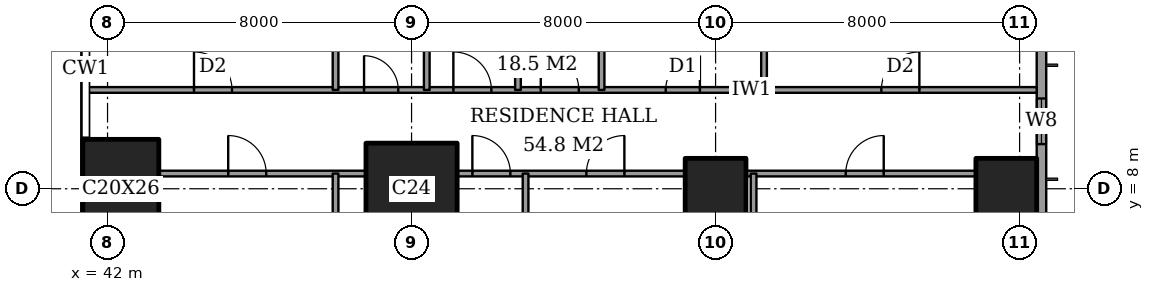
"""IFC4 building model, lengths in metres.
Left out: names, types, materials, properties, quantities, classifications, styles, units other than length and angle.
Written with IfcOpenShell. Run it as: python <this file> out.ifc"""

import sys

from ifc_helpers import new_model, si_unit, direction, frame, frame_2d, origin, origin_2d, place, context, subcontext, project, spatial, rectangle, extrude, element, fill, save


model = new_model("IFC4")
c1 = context("Model", 3, precision=1e-05, world=origin(), true_north=direction((0.0, 1.0)))
c2 = subcontext(c1, "Body", "Model", "MODEL_VIEW")
j1 = project(units=[si_unit("LENGTHUNIT", "METRE"), si_unit("PLANEANGLEUNIT", "RADIAN")], contexts=[c1])
p1 = place(None, origin())
s1 = spatial("IfcSite", under=j1, at=p1, CompositionType="ELEMENT")
p2 = place(p1, origin())
s2 = spatial("IfcBuilding", under=s1, at=p2, CompositionType="ELEMENT")
p3 = place(p2, frame((0.0, 0.0, 248.4)))
s3 = spatial("IfcBuildingStorey", under=s2, at=p3, CompositionType="ELEMENT", Elevation=248.4)
p4 = place(p3, frame((42.35, 8.0, 0.0), z_axis=(0.0, 0.0, 1.0), x_axis=(1.0, 0.0, 0.0)))
e1 = element("IfcColumn", 1, at=p4, inside=s3, PredefinedType="COLUMN", context=c2, shape_type="SweptSolid", body=[
    extrude(rectangle(XDim=2.0, YDim=2.6, at=origin_2d()), origin(), (0.0, 0.0, 1.0), 3.6),
])
p5 = place(p3, frame((50.0, 8.0, 0.0), z_axis=(0.0, 0.0, 1.0), x_axis=(1.0, 0.0, 0.0)))
e2 = element("IfcColumn", 2, at=p5, inside=s3, PredefinedType="COLUMN", context=c2, shape_type="SweptSolid", body=[
    extrude(rectangle(XDim=2.4, YDim=2.4, at=origin_2d()), origin(), (0.0, 0.0, 1.0), 3.6),
])
for number, where, z_axis, x_axis in (
    (3, (58.0, 8.0, 0.0), (0.0, 0.0, 1.0), (1.0, 0.0, 0.0)),
    (4, (65.65, 8.0, 0.0), (0.0, 0.0, 1.0), (1.0, 0.0, 0.0)),
):
    element("IfcColumn", number, at=place(p3, frame(where, z_axis=z_axis, x_axis=x_axis)), inside=s3, PredefinedType="COLUMN", context=c2, shape_type="SweptSolid", body=[
        extrude(rectangle(XDim=1.6, YDim=1.6, at=origin_2d()), origin(), (0.0, 0.0, 1.0), 3.6),
    ])
p6 = place(p3, frame((66.575, 3.175, 0.0), z_axis=(0.0, 0.0, 1.0), x_axis=(0.0, 1.0, 0.0)))
e5 = element("IfcWall", 5, at=p6, inside=s3, PredefinedType="SOLIDWALL", context=c2, shape_type="SweptSolid", body=[
    extrude(rectangle(XDim=41.65, YDim=0.25, at=frame_2d((20.825, 0.0))), origin(), (0.0, 0.0, 1.0), 3.6),
])
p7 = place(p6, frame((0.875, 0.0, 0.6)))
e6 = element("IfcOpeningElement", 6, at=p7, cuts=e5, PredefinedType="OPENING", context=c2, shape_type="SweptSolid", body=[
    extrude(rectangle(XDim=2.4, YDim=2.0, at=frame_2d((1.2, 1.0))), frame((0.0, 0.135, 0.0), z_axis=(0.0, -1.0, 0.0), x_axis=(1.0, 0.0, 0.0)), (0.0, 0.0, 1.0), 0.27),
])
p8 = place(p6, frame((6.0, 0.0, 0.6)))
e7 = element("IfcOpeningElement", 7, at=p8, cuts=e5, PredefinedType="OPENING", context=c2, shape_type="SweptSolid", body=[
    extrude(rectangle(XDim=1.2, YDim=2.0, at=frame_2d((0.6, 1.0))), frame((0.0, 0.135, 0.0), z_axis=(0.0, -1.0, 0.0), x_axis=(1.0, 0.0, 0.0)), (0.0, 0.0, 1.0), 0.27),
])
p9 = place(p6, frame((8.525, 0.0, 0.6)))
e8 = element("IfcOpeningElement", 8, at=p9, cuts=e5, PredefinedType="OPENING", context=c2, shape_type="SweptSolid", body=[
    extrude(rectangle(XDim=2.4, YDim=2.0, at=frame_2d((1.2, 1.0))), frame((0.0, 0.135, 0.0), z_axis=(0.0, -1.0, 0.0), x_axis=(1.0, 0.0, 0.0)), (0.0, 0.0, 1.0), 0.27),
])
p10 = place(p6, frame((15.725, 0.0, 0.6)))
e9 = element("IfcOpeningElement", 9, at=p10, cuts=e5, PredefinedType="OPENING", context=c2, shape_type="SweptSolid", body=[
    extrude(rectangle(XDim=2.4, YDim=2.0, at=frame_2d((1.2, 1.0))), frame((0.0, 0.135, 0.0), z_axis=(0.0, -1.0, 0.0), x_axis=(1.0, 0.0, 0.0)), (0.0, 0.0, 1.0), 0.27),
])
p11 = place(p6, frame((23.525, 0.0, 0.6)))
e10 = element("IfcOpeningElement", 10, at=p11, cuts=e5, PredefinedType="OPENING", context=c2, shape_type="SweptSolid", body=[
    extrude(rectangle(XDim=2.4, YDim=2.0, at=frame_2d((1.2, 1.0))), frame((0.0, 0.135, 0.0), z_axis=(0.0, -1.0, 0.0), x_axis=(1.0, 0.0, 0.0)), (0.0, 0.0, 1.0), 0.27),
])
p12 = place(p6, frame((30.625, 0.0, 0.6)))
e11 = element("IfcOpeningElement", 11, at=p12, cuts=e5, PredefinedType="OPENING", context=c2, shape_type="SweptSolid", body=[
    extrude(rectangle(XDim=2.4, YDim=2.0, at=frame_2d((1.2, 1.0))), frame((0.0, 0.135, 0.0), z_axis=(0.0, -1.0, 0.0), x_axis=(1.0, 0.0, 0.0)), (0.0, 0.0, 1.0), 0.27),
])
p13 = place(p6, frame((34.325, 0.0, 0.6)))
e12 = element("IfcOpeningElement", 12, at=p13, cuts=e5, PredefinedType="OPENING", context=c2, shape_type="SweptSolid", body=[
    extrude(rectangle(XDim=1.2, YDim=2.0, at=frame_2d((0.6, 1.0))), frame((0.0, 0.135, 0.0), z_axis=(0.0, -1.0, 0.0), x_axis=(1.0, 0.0, 0.0)), (0.0, 0.0, 1.0), 0.27),
])
p14 = place(p6, frame((38.375, 0.0, 0.6)))
e13 = element("IfcOpeningElement", 13, at=p14, cuts=e5, PredefinedType="OPENING", context=c2, shape_type="SweptSolid", body=[
    extrude(rectangle(XDim=2.4, YDim=2.0, at=frame_2d((1.2, 1.0))), frame((0.0, 0.135, 0.0), z_axis=(0.0, -1.0, 0.0), x_axis=(1.0, 0.0, 0.0)), (0.0, 0.0, 1.0), 0.27),
])
p15 = place(p3, frame((43.35, 8.4, 0.0), z_axis=(0.0, 0.0, 1.0), x_axis=(1.0, 0.0, 0.0)))
e14 = element("IfcWall", 14, at=p15, inside=s3, PredefinedType="PARTITIONING", context=c2, shape_type="SweptSolid", body=[
    extrude(rectangle(XDim=5.45, YDim=0.15, at=frame_2d((2.725, 0.0))), origin(), (0.0, 0.0, 1.0), 3.35),
])
p16 = place(p15, frame((1.825, 0.0, 0.0)))
e15 = element("IfcOpeningElement", 15, at=p16, cuts=e14, PredefinedType="OPENING", context=c2, shape_type="SweptSolid", body=[
    extrude(rectangle(XDim=1.0, YDim=2.1, at=frame_2d((0.5, 1.05))), frame((0.0, 0.085, 0.0), z_axis=(0.0, -1.0, 0.0), x_axis=(1.0, 0.0, 0.0)), (0.0, 0.0, 1.0), 0.17),
])
p17 = place(p3, frame((51.2, 8.4, 0.0), z_axis=(0.0, 0.0, 1.0), x_axis=(1.0, 0.0, 0.0)))
e16 = element("IfcWall", 16, at=p17, inside=s3, PredefinedType="PARTITIONING", context=c2, shape_type="SweptSolid", body=[
    extrude(rectangle(XDim=6.0, YDim=0.15, at=frame_2d((3.0, 0.0))), origin(), (0.0, 0.0, 1.0), 3.35),
])
p18 = place(p17, frame((3.4, 0.0, 0.0)))
e17 = element("IfcOpeningElement", 17, at=p18, cuts=e16, PredefinedType="OPENING", context=c2, shape_type="SweptSolid", body=[
    extrude(rectangle(XDim=1.0, YDim=2.1, at=frame_2d((0.5, 1.05))), frame((0.0, 0.085, 0.0), z_axis=(0.0, -1.0, 0.0), x_axis=(1.0, 0.0, 0.0)), (0.0, 0.0, 1.0), 0.17),
])
p19 = place(p17, frame((0.4, 0.0, 0.0)))
e18 = element("IfcOpeningElement", 18, at=p19, cuts=e16, PredefinedType="OPENING", context=c2, shape_type="SweptSolid", body=[
    extrude(rectangle(XDim=1.0, YDim=2.1, at=frame_2d((0.5, 1.05))), frame((0.0, 0.085, 0.0), z_axis=(0.0, -1.0, 0.0), x_axis=(1.0, 0.0, 0.0)), (0.0, 0.0, 1.0), 0.17),
])
p20 = place(p3, frame((58.8, 8.4, 0.0), z_axis=(0.0, 0.0, 1.0), x_axis=(1.0, 0.0, 0.0)))
e19 = element("IfcWall", 19, at=p20, inside=s3, PredefinedType="PARTITIONING", context=c2, shape_type="SweptSolid", body=[
    extrude(rectangle(XDim=6.05, YDim=0.15, at=frame_2d((3.025, 0.0))), origin(), (0.0, 0.0, 1.0), 3.35),
])
p21 = place(p20, frame((2.625, 0.0, 0.0)))
e20 = element("IfcOpeningElement", 20, at=p21, cuts=e19, PredefinedType="OPENING", context=c2, shape_type="SweptSolid", body=[
    extrude(rectangle(XDim=1.0, YDim=2.1, at=frame_2d((0.5, 1.05))), frame((0.0, 0.085, 0.0), z_axis=(0.0, -1.0, 0.0), x_axis=(1.0, 0.0, 0.0)), (0.0, 0.0, 1.0), 0.17),
])
p22 = place(p3, frame((41.439, 10.6, 0.0), z_axis=(0.0, 0.0, 1.0), x_axis=(1.0, 0.0, 0.0)))
e21 = element("IfcWall", 21, at=p22, inside=s3, PredefinedType="PARTITIONING", context=c2, shape_type="SweptSolid", body=[
    extrude(rectangle(XDim=25.011, YDim=0.15, at=frame_2d((12.505, 0.0))), origin(), (0.0, 0.0, 1.0), 3.35),
])
p23 = place(p22, frame((11.961, 0.0, 0.0)))
e22 = element("IfcOpeningElement", 22, at=p23, cuts=e21, PredefinedType="OPENING", context=c2, shape_type="SweptSolid", body=[
    extrude(rectangle(XDim=1.0, YDim=2.1, at=frame_2d((0.5, 1.05))), frame((0.0, 0.085, 0.0), z_axis=(0.0, -1.0, 0.0), x_axis=(1.0, 0.0, 0.0)), (0.0, 0.0, 1.0), 0.17),
])
p24 = place(p22, frame((20.924, 0.0, 0.0)))
e23 = element("IfcOpeningElement", 23, at=p24, cuts=e21, PredefinedType="OPENING", context=c2, shape_type="SweptSolid", body=[
    extrude(rectangle(XDim=1.0, YDim=2.1, at=frame_2d((0.5, 1.05))), frame((0.0, 0.085, 0.0), z_axis=(0.0, -1.0, 0.0), x_axis=(1.0, 0.0, 0.0)), (0.0, 0.0, 1.0), 0.17),
])
p25 = place(p22, frame((15.249, 0.0, 0.0)))
e24 = element("IfcOpeningElement", 24, at=p25, cuts=e21, PredefinedType="OPENING", context=c2, shape_type="SweptSolid", body=[
    extrude(rectangle(XDim=0.9, YDim=2.1, at=frame_2d((0.45, 1.05))), frame((0.0, 0.085, 0.0), z_axis=(0.0, -1.0, 0.0), x_axis=(1.0, 0.0, 0.0)), (0.0, 0.0, 1.0), 0.17),
])
p26 = place(p22, frame((9.661, 0.0, 0.0)))
e25 = element("IfcOpeningElement", 25, at=p26, cuts=e21, PredefinedType="OPENING", context=c2, shape_type="SweptSolid", body=[
    extrude(rectangle(XDim=1.0, YDim=2.1, at=frame_2d((0.5, 1.05))), frame((0.0, 0.085, 0.0), z_axis=(0.0, -1.0, 0.0), x_axis=(1.0, 0.0, 0.0)), (0.0, 0.0, 1.0), 0.17),
])
p27 = place(p22, frame((7.311, 0.0, 0.0)))
e26 = element("IfcOpeningElement", 26, at=p27, cuts=e21, PredefinedType="OPENING", context=c2, shape_type="SweptSolid", body=[
    extrude(rectangle(XDim=0.9, YDim=2.1, at=frame_2d((0.45, 1.05))), frame((0.0, 0.085, 0.0), z_axis=(0.0, -1.0, 0.0), x_axis=(1.0, 0.0, 0.0)), (0.0, 0.0, 1.0), 0.17),
])
p28 = place(p22, frame((2.836, 0.0, 0.0)))
e27 = element("IfcOpeningElement", 27, at=p28, cuts=e21, PredefinedType="OPENING", context=c2, shape_type="SweptSolid", body=[
    extrude(rectangle(XDim=1.0, YDim=2.1, at=frame_2d((0.5, 1.05))), frame((0.0, 0.085, 0.0), z_axis=(0.0, -1.0, 0.0), x_axis=(1.0, 0.0, 0.0)), (0.0, 0.0, 1.0), 0.17),
])
p29 = place(p3, frame((48.0, -0.45, 0.0), z_axis=(0.0, 0.0, 1.0), x_axis=(0.0, 1.0, 0.0)))
e28 = element("IfcWall", 28, at=p29, inside=s3, PredefinedType="PARTITIONING", context=c2, shape_type="SweptSolid", body=[
    extrude(rectangle(XDim=8.85, YDim=0.15, at=frame_2d((4.425, 0.0))), origin(), (0.0, 0.0, 1.0), 3.35),
])
p30 = place(p3, frame((48.0, 10.6, 0.0), z_axis=(0.0, 0.0, 1.0), x_axis=(0.0, 1.0, 0.0)))
e29 = element("IfcWall", 29, at=p30, inside=s3, PredefinedType="PARTITIONING", context=c2, shape_type="SweptSolid", body=[
    extrude(rectangle(XDim=8.4, YDim=0.15, at=frame_2d((4.2, 0.0))), origin(), (0.0, 0.0, 1.0), 3.35),
])
p31 = place(p30, frame((6.7, 0.0, 0.0)))
e30 = element("IfcOpeningElement", 30, at=p31, cuts=e29, PredefinedType="OPENING", context=c2, shape_type="SweptSolid", body=[
    extrude(rectangle(XDim=0.9, YDim=2.1, at=frame_2d((0.45, 1.05))), frame((0.0, 0.085, 0.0), z_axis=(0.0, -1.0, 0.0), x_axis=(1.0, 0.0, 0.0)), (0.0, 0.0, 1.0), 0.17),
])
p32 = place(p3, frame((50.4, 10.6, 0.0), z_axis=(0.0, 0.0, 1.0), x_axis=(0.0, 1.0, 0.0)))
e31 = element("IfcWall", 31, at=p32, inside=s3, PredefinedType="PARTITIONING", context=c2, shape_type="SweptSolid", body=[
    extrude(rectangle(XDim=4.2, YDim=0.15, at=frame_2d((2.1, 0.0))), origin(), (0.0, 0.0, 1.0), 3.35),
])
p33 = place(p3, frame((52.8, 10.6, 0.0), z_axis=(0.0, 0.0, 1.0), x_axis=(0.0, 1.0, 0.0)))
e32 = element("IfcWall", 32, at=p33, inside=s3, PredefinedType="PARTITIONING", context=c2, shape_type="SweptSolid", body=[
    extrude(rectangle(XDim=8.4, YDim=0.15, at=frame_2d((4.2, 0.0))), origin(), (0.0, 0.0, 1.0), 3.35),
])
p34 = place(p3, frame((53.0, -0.45, 0.0), z_axis=(0.0, 0.0, 1.0), x_axis=(0.0, 1.0, 0.0)))
e33 = element("IfcWall", 33, at=p34, inside=s3, PredefinedType="PARTITIONING", context=c2, shape_type="SweptSolid", body=[
    extrude(rectangle(XDim=8.85, YDim=0.15, at=frame_2d((4.425, 0.0))), origin(), (0.0, 0.0, 1.0), 3.35),
])
p35 = place(p3, frame((55.0, 10.6, 0.0), z_axis=(0.0, 0.0, 1.0), x_axis=(0.0, 1.0, 0.0)))
e34 = element("IfcWall", 34, at=p35, inside=s3, PredefinedType="PARTITIONING", context=c2, shape_type="SweptSolid", body=[
    extrude(rectangle(XDim=11.0, YDim=0.15, at=frame_2d((5.5, 0.0))), origin(), (0.0, 0.0, 1.0), 3.35),
])
p36 = place(p35, frame((9.2, 0.0, 0.0)))
e35 = element("IfcOpeningElement", 35, at=p36, cuts=e34, PredefinedType="OPENING", context=c2, shape_type="SweptSolid", body=[
    extrude(rectangle(XDim=1.0, YDim=2.1, at=frame_2d((0.5, 1.05))), frame((0.0, 0.085, 0.0), z_axis=(0.0, -1.0, 0.0), x_axis=(1.0, 0.0, 0.0)), (0.0, 0.0, 1.0), 0.17),
])
p37 = place(p3, frame((59.0, -0.45, 0.0), z_axis=(0.0, 0.0, 1.0), x_axis=(0.0, 1.0, 0.0)))
e36 = element("IfcWall", 36, at=p37, inside=s3, PredefinedType="PARTITIONING", context=c2, shape_type="SweptSolid", body=[
    extrude(rectangle(XDim=8.85, YDim=0.15, at=frame_2d((4.425, 0.0))), origin(), (0.0, 0.0, 1.0), 3.35),
])
p38 = place(p3, frame((59.275, 10.6, 0.0), z_axis=(0.0, 0.0, 1.0), x_axis=(0.0, 1.0, 0.0)))
e37 = element("IfcWall", 37, at=p38, inside=s3, PredefinedType="PARTITIONING", context=c2, shape_type="SweptSolid", body=[
    extrude(rectangle(XDim=4.2, YDim=0.15, at=frame_2d((2.1, 0.0))), origin(), (0.0, 0.0, 1.0), 3.35),
])
p39 = place(p8, origin())
e38 = element("IfcWindow", 38, at=p39, inside=s3, PartitioningType="SINGLE_PANEL", PredefinedType="WINDOW", context=c2, shape_type="SweptSolid", body=[
    extrude(rectangle(XDim=1.2, YDim=2.0, at=frame_2d((0.6, 1.0))), frame((0.0, 0.03, 0.0), z_axis=(0.0, -1.0, 0.0), x_axis=(1.0, 0.0, 0.0)), (0.0, 0.0, 1.0), 0.06),
])
fill(e7, e38)
p40 = place(p21, origin())
e39 = element("IfcDoor", 39, at=p40, inside=s3, OperationType="SINGLE_SWING_LEFT", PredefinedType="DOOR", context=c2, shape_type="SweptSolid", body=[
    extrude(rectangle(XDim=1.0, YDim=2.1, at=frame_2d((0.5, 1.05))), frame((0.0, 0.025, 0.0), z_axis=(0.0, -1.0, 0.0), x_axis=(1.0, 0.0, 0.0)), (0.0, 0.0, 1.0), 0.05),
])
fill(e20, e39)
p41 = place(p18, origin())
e40 = element("IfcDoor", 40, at=p41, inside=s3, OperationType="SINGLE_SWING_LEFT", PredefinedType="DOOR", context=c2, shape_type="SweptSolid", body=[
    extrude(rectangle(XDim=1.0, YDim=2.1, at=frame_2d((0.5, 1.05))), frame((0.0, 0.025, 0.0), z_axis=(0.0, -1.0, 0.0), x_axis=(1.0, 0.0, 0.0)), (0.0, 0.0, 1.0), 0.05),
])
fill(e17, e40)
p42 = place(p19, origin())
e41 = element("IfcDoor", 41, at=p42, inside=s3, OperationType="SINGLE_SWING_RIGHT", PredefinedType="DOOR", context=c2, shape_type="SweptSolid", body=[
    extrude(rectangle(XDim=1.0, YDim=2.1, at=frame_2d((0.5, 1.05))), frame((0.0, 0.025, 0.0), z_axis=(0.0, -1.0, 0.0), x_axis=(1.0, 0.0, 0.0)), (0.0, 0.0, 1.0), 0.05),
])
fill(e18, e41)
p43 = place(p16, origin())
e42 = element("IfcDoor", 42, at=p43, inside=s3, OperationType="SINGLE_SWING_RIGHT", PredefinedType="DOOR", context=c2, shape_type="SweptSolid", body=[
    extrude(rectangle(XDim=1.0, YDim=2.1, at=frame_2d((0.5, 1.05))), frame((0.0, 0.025, 0.0), z_axis=(0.0, -1.0, 0.0), x_axis=(1.0, 0.0, 0.0)), (0.0, 0.0, 1.0), 0.05),
])
fill(e15, e42)
p44 = place(p23, origin())
e43 = element("IfcDoor", 43, at=p44, inside=s3, OperationType="SINGLE_SWING_RIGHT", PredefinedType="DOOR", context=c2, shape_type="SweptSolid", body=[
    extrude(rectangle(XDim=1.0, YDim=2.1, at=frame_2d((0.5, 1.05))), frame((0.0, 0.025, 0.0), z_axis=(0.0, -1.0, 0.0), x_axis=(1.0, 0.0, 0.0)), (0.0, 0.0, 1.0), 0.05),
])
fill(e22, e43)
p45 = place(p24, origin())
e44 = element("IfcDoor", 44, at=p45, inside=s3, OperationType="SINGLE_SWING_LEFT", PredefinedType="DOOR", context=c2, shape_type="SweptSolid", body=[
    extrude(rectangle(XDim=1.0, YDim=2.1, at=frame_2d((0.5, 1.05))), frame((0.0, 0.025, 0.0), z_axis=(0.0, -1.0, 0.0), x_axis=(1.0, 0.0, 0.0)), (0.0, 0.0, 1.0), 0.05),
])
fill(e23, e44)
p46 = place(p25, origin())
e45 = element("IfcDoor", 45, at=p46, inside=s3, OperationType="SINGLE_SWING_LEFT", PredefinedType="DOOR", context=c2, shape_type="SweptSolid", body=[
    extrude(rectangle(XDim=0.9, YDim=2.1, at=frame_2d((0.45, 1.05))), frame((0.0, 0.025, 0.0), z_axis=(0.0, -1.0, 0.0), x_axis=(1.0, 0.0, 0.0)), (0.0, 0.0, 1.0), 0.05),
])
fill(e24, e45)
p47 = place(p26, origin())
e46 = element("IfcDoor", 46, at=p47, inside=s3, OperationType="SINGLE_SWING_RIGHT", PredefinedType="DOOR", context=c2, shape_type="SweptSolid", body=[
    extrude(rectangle(XDim=1.0, YDim=2.1, at=frame_2d((0.5, 1.05))), frame((0.0, 0.025, 0.0), z_axis=(0.0, -1.0, 0.0), x_axis=(1.0, 0.0, 0.0)), (0.0, 0.0, 1.0), 0.05),
])
fill(e25, e46)
p48 = place(p27, origin())
e47 = element("IfcDoor", 47, at=p48, inside=s3, OperationType="SINGLE_SWING_RIGHT", PredefinedType="DOOR", context=c2, shape_type="SweptSolid", body=[
    extrude(rectangle(XDim=0.9, YDim=2.1, at=frame_2d((0.45, 1.05))), frame((0.0, 0.025, 0.0), z_axis=(0.0, -1.0, 0.0), x_axis=(1.0, 0.0, 0.0)), (0.0, 0.0, 1.0), 0.05),
])
fill(e26, e47)
p49 = place(p28, origin())
e48 = element("IfcDoor", 48, at=p49, inside=s3, OperationType="SINGLE_SWING_RIGHT", PredefinedType="DOOR", context=c2, shape_type="SweptSolid", body=[
    extrude(rectangle(XDim=1.0, YDim=2.1, at=frame_2d((0.5, 1.05))), frame((0.0, 0.025, 0.0), z_axis=(0.0, -1.0, 0.0), x_axis=(1.0, 0.0, 0.0)), (0.0, 0.0, 1.0), 0.05),
])
fill(e27, e48)
save(model, sys.argv[1])
